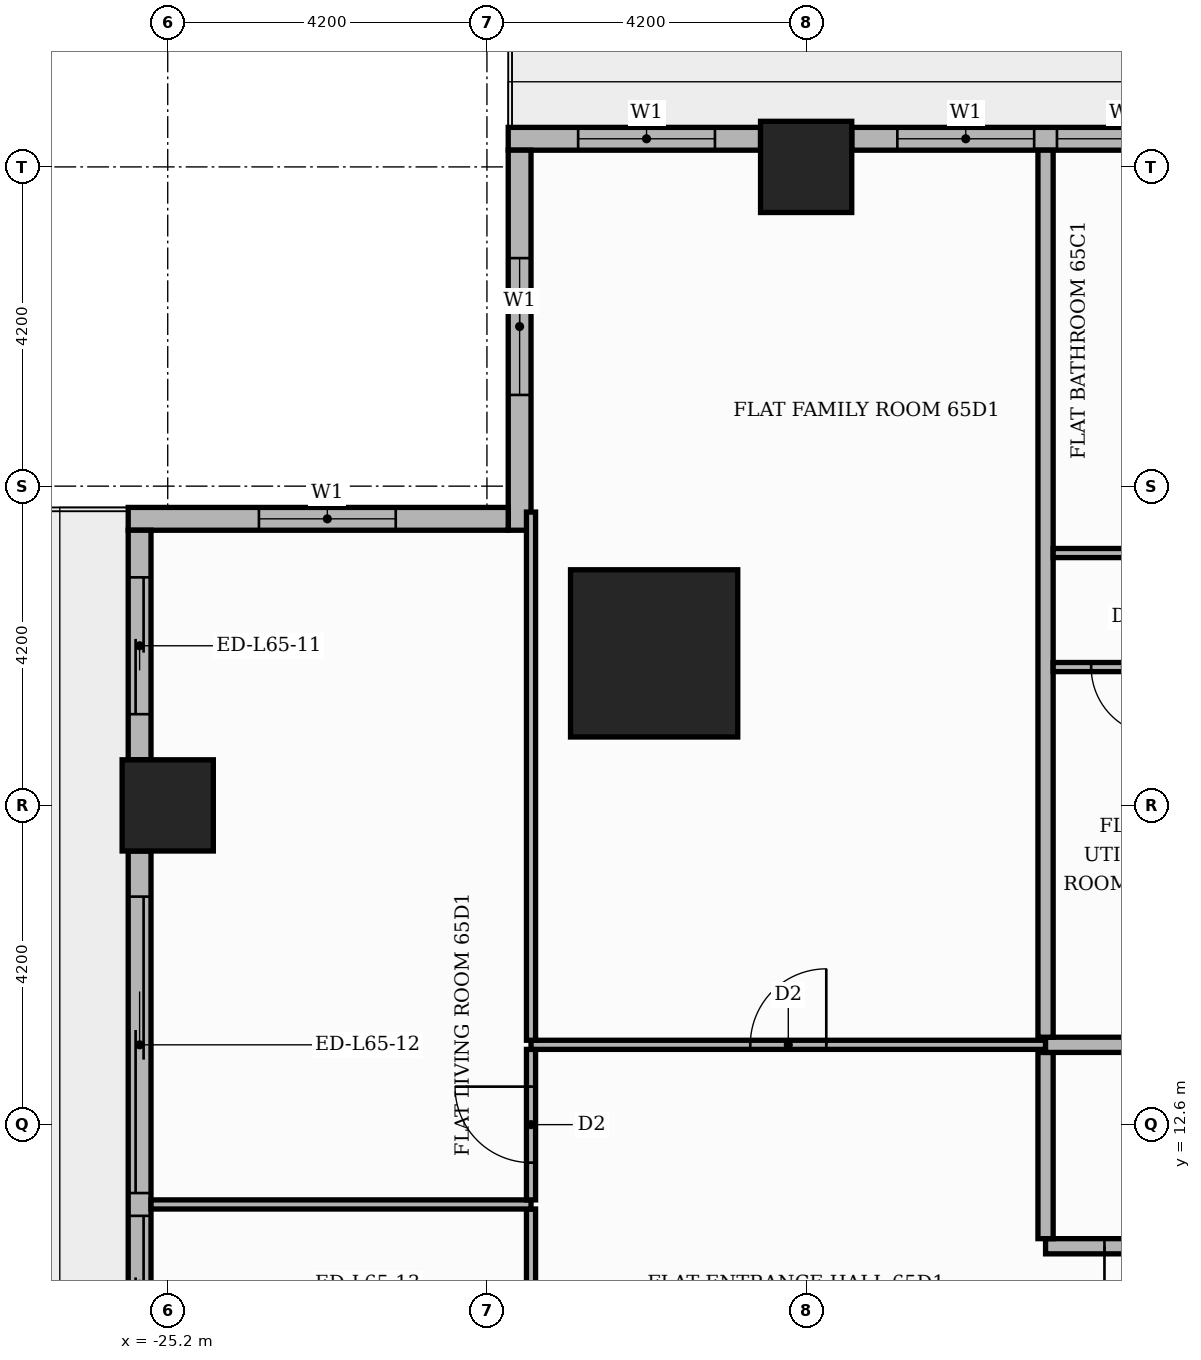
"""IFC4 building model, lengths in metres.
Left out: names, types, materials, properties, quantities, classifications, styles, units other than length and angle.
Written with IfcOpenShell. Run it as: python <this file> out.ifc"""

import sys

from ifc_helpers import new_model, si_unit, direction, frame, frame_2d, origin, origin_2d, place, context, subcontext, project, spatial, rectangle, extrude, element, fill, save


model = new_model("IFC4")
c1 = context("Model", 3, precision=1e-05, world=origin(), true_north=direction((0.0, 1.0)))
c2 = subcontext(c1, "Body", "Model", "MODEL_VIEW")
j1 = project(units=[si_unit("LENGTHUNIT", "METRE"), si_unit("PLANEANGLEUNIT", "RADIAN")], contexts=[c1])
p1 = place(None, origin())
s1 = spatial("IfcSite", under=j1, at=p1, CompositionType="ELEMENT")
p2 = place(p1, origin())
s2 = spatial("IfcBuilding", under=s1, at=p2, CompositionType="ELEMENT")
p3 = place(p2, frame((0.0, 0.0, 271.8)))
s3 = spatial("IfcBuildingStorey", under=s2, at=p3, CompositionType="ELEMENT", Elevation=271.8)
p4 = place(p3, frame((-18.8, 18.8, 0.0), z_axis=(0.0, 0.0, 1.0), x_axis=(1.0, 0.0, 0.0)))
e1 = element("IfcColumn", 1, at=p4, inside=s3, PredefinedType="COLUMN", context=c2, shape_type="SweptSolid", body=[
    extrude(rectangle(XDim=2.2, YDim=2.2, at=origin_2d()), origin(), (0.0, 0.0, 1.0), 3.9),
])
for number, where, z_axis, x_axis in (
    (2, (-16.8, 25.2, 0.0), (0.0, 0.0, 1.0), (1.0, 0.0, 0.0)),
    (3, (-25.2, 16.8, 0.0), (0.0, 0.0, 1.0), (1.0, 0.0, 0.0)),
):
    element("IfcColumn", number, at=place(p3, frame(where, z_axis=z_axis, x_axis=x_axis)), inside=s3, PredefinedType="COLUMN", context=c2, shape_type="SweptSolid", body=[
        extrude(rectangle(XDim=1.2, YDim=1.2, at=origin_2d()), origin(), (0.0, 0.0, 1.0), 3.9),
    ])
p5 = place(p3, frame((-9.0, 25.57, 0.0), z_axis=(0.0, 0.0, 1.0), x_axis=(-1.0, 0.0, 0.0)))
e4 = element("IfcWall", 4, at=p5, inside=s3, PredefinedType="STANDARD", context=c2, shape_type="SweptSolid", body=[
    extrude(rectangle(XDim=7.2, YDim=0.3, at=frame_2d((3.6, 0.0))), origin(), (0.0, 0.0, 1.0), 3.48),
])
p6 = place(p5, frame((0.6, 0.0, 0.9)))
e5 = element("IfcOpeningElement", 5, at=p6, cuts=e4, PredefinedType="OPENING", context=c2, shape_type="SweptSolid", body=[
    extrude(rectangle(XDim=1.8, YDim=2.1, at=frame_2d((0.9, 1.05))), frame((0.0, 0.16, 0.0), z_axis=(0.0, -1.0, 0.0), x_axis=(1.0, 0.0, 0.0)), (0.0, 0.0, 1.0), 0.32),
])
p7 = place(p5, frame((2.7, 0.0, 0.9)))
e6 = element("IfcOpeningElement", 6, at=p7, cuts=e4, PredefinedType="OPENING", context=c2, shape_type="SweptSolid", body=[
    extrude(rectangle(XDim=1.8, YDim=2.1, at=frame_2d((0.9, 1.05))), frame((0.0, 0.16, 0.0), z_axis=(0.0, -1.0, 0.0), x_axis=(1.0, 0.0, 0.0)), (0.0, 0.0, 1.0), 0.32),
])
p8 = place(p5, frame((4.8, 0.0, 0.9)))
e7 = element("IfcOpeningElement", 7, at=p8, cuts=e4, PredefinedType="OPENING", context=c2, shape_type="SweptSolid", body=[
    extrude(rectangle(XDim=1.8, YDim=2.1, at=frame_2d((0.9, 1.05))), frame((0.0, 0.16, 0.0), z_axis=(0.0, -1.0, 0.0), x_axis=(1.0, 0.0, 0.0)), (0.0, 0.0, 1.0), 0.32),
])
p9 = place(p3, frame((-17.4, 25.57, 0.0), z_axis=(0.0, 0.0, 1.0), x_axis=(-1.0, 0.0, 0.0)))
e8 = element("IfcWall", 8, at=p9, inside=s3, PredefinedType="STANDARD", context=c2, shape_type="SweptSolid", body=[
    extrude(rectangle(XDim=3.32, YDim=0.3, at=frame_2d((1.66, 0.0))), origin(), (0.0, 0.0, 1.0), 3.48),
])
p10 = place(p9, frame((0.6, 0.0, 0.9)))
e9 = element("IfcOpeningElement", 9, at=p10, cuts=e8, PredefinedType="OPENING", context=c2, shape_type="SweptSolid", body=[
    extrude(rectangle(XDim=1.8, YDim=2.1, at=frame_2d((0.9, 1.05))), frame((0.0, 0.16, 0.0), z_axis=(0.0, -1.0, 0.0), x_axis=(1.0, 0.0, 0.0)), (0.0, 0.0, 1.0), 0.32),
])
p11 = place(p3, frame((-20.57, 25.42, 0.0), z_axis=(0.0, 0.0, 1.0), x_axis=(0.0, -1.0, 0.0)))
e10 = element("IfcWall", 10, at=p11, inside=s3, PredefinedType="STANDARD", context=c2, shape_type="SweptSolid", body=[
    extrude(rectangle(XDim=5.0, YDim=0.3, at=frame_2d((2.5, 0.0))), origin(), (0.0, 0.0, 1.0), 3.48),
])
p12 = place(p11, frame((1.42, 0.0, 0.9)))
e11 = element("IfcOpeningElement", 11, at=p12, cuts=e10, PredefinedType="OPENING", context=c2, shape_type="SweptSolid", body=[
    extrude(rectangle(XDim=1.8, YDim=2.1, at=frame_2d((0.9, 1.05))), frame((0.0, 0.16, 0.0), z_axis=(0.0, -1.0, 0.0), x_axis=(1.0, 0.0, 0.0)), (0.0, 0.0, 1.0), 0.32),
])
p13 = place(p3, frame((-20.72, 20.57, 0.0), z_axis=(0.0, 0.0, 1.0), x_axis=(-1.0, 0.0, 0.0)))
e12 = element("IfcWall", 12, at=p13, inside=s3, PredefinedType="STANDARD", context=c2, shape_type="SweptSolid", body=[
    extrude(rectangle(XDim=5.0, YDim=0.3, at=frame_2d((2.5, 0.0))), origin(), (0.0, 0.0, 1.0), 3.48),
])
p14 = place(p13, frame((1.48, 0.0, 0.9)))
e13 = element("IfcOpeningElement", 13, at=p14, cuts=e12, PredefinedType="OPENING", context=c2, shape_type="SweptSolid", body=[
    extrude(rectangle(XDim=1.8, YDim=2.1, at=frame_2d((0.9, 1.05))), frame((0.0, 0.16, 0.0), z_axis=(0.0, -1.0, 0.0), x_axis=(1.0, 0.0, 0.0)), (0.0, 0.0, 1.0), 0.32),
])
p15 = place(p3, frame((-25.57, 20.42, 0.0), z_axis=(0.0, 0.0, 1.0), x_axis=(0.0, -1.0, 0.0)))
e14 = element("IfcWall", 14, at=p15, inside=s3, PredefinedType="STANDARD", context=c2, shape_type="SweptSolid", body=[
    extrude(rectangle(XDim=3.02, YDim=0.3, at=frame_2d((1.51, 0.0))), origin(), (0.0, 0.0, 1.0), 3.48),
])
p16 = place(p15, frame((0.62, 0.0, 0.0)))
e15 = element("IfcOpeningElement", 15, at=p16, cuts=e14, PredefinedType="OPENING", context=c2, shape_type="SweptSolid", body=[
    extrude(rectangle(XDim=1.8, YDim=2.4, at=frame_2d((0.9, 1.2))), frame((0.0, 0.16, 0.0), z_axis=(0.0, -1.0, 0.0), x_axis=(1.0, 0.0, 0.0)), (0.0, 0.0, 1.0), 0.32),
])
p17 = place(p3, frame((-25.57, 16.2, 0.0), z_axis=(0.0, 0.0, 1.0), x_axis=(0.0, -1.0, 0.0)))
e16 = element("IfcWall", 16, at=p17, inside=s3, PredefinedType="STANDARD", context=c2, shape_type="SweptSolid", body=[
    extrude(rectangle(XDim=7.2, YDim=0.3, at=frame_2d((3.6, 0.0))), origin(), (0.0, 0.0, 1.0), 3.48),
])
p18 = place(p17, frame((0.6, 0.0, 0.0)))
e17 = element("IfcOpeningElement", 17, at=p18, cuts=e16, PredefinedType="OPENING", context=c2, shape_type="SweptSolid", body=[
    extrude(rectangle(XDim=3.9, YDim=2.4, at=frame_2d((1.95, 1.2))), frame((0.0, 0.16, 0.0), z_axis=(0.0, -1.0, 0.0), x_axis=(1.0, 0.0, 0.0)), (0.0, 0.0, 1.0), 0.32),
])
p19 = place(p17, frame((4.8, 0.0, 0.0)))
e18 = element("IfcOpeningElement", 18, at=p19, cuts=e16, PredefinedType="OPENING", context=c2, shape_type="SweptSolid", body=[
    extrude(rectangle(XDim=1.8, YDim=2.4, at=frame_2d((0.9, 1.2))), frame((0.0, 0.16, 0.0), z_axis=(0.0, -1.0, 0.0), x_axis=(1.0, 0.0, 0.0)), (0.0, 0.0, 1.0), 0.32),
])
p20 = place(p3, frame((-20.42, 3.21, 0.0), z_axis=(0.0, 0.0, 1.0), x_axis=(0.0, 1.0, 0.0)))
e19 = element("IfcWall", 19, at=p20, inside=s3, PredefinedType="PARTITIONING", context=c2, shape_type="SweptSolid", body=[
    extrude(rectangle(XDim=8.28, YDim=0.12, at=frame_2d((4.14, 0.0))), origin(), (0.0, 0.0, 1.0), 3.48),
])
p21 = place(p20, frame((3.69, 0.0, 0.0)))
e20 = element("IfcOpeningElement", 20, at=p21, cuts=e19, PredefinedType="OPENING", context=c2, shape_type="SweptSolid", body=[
    extrude(rectangle(XDim=0.9, YDim=2.1, at=frame_2d((0.45, 1.05))), frame((0.0, 0.07, 0.0), z_axis=(0.0, -1.0, 0.0), x_axis=(1.0, 0.0, 0.0)), (0.0, 0.0, 1.0), 0.14),
])
p22 = place(p3, frame((-13.65, 11.0, 0.0), z_axis=(0.0, 0.0, 1.0), x_axis=(1.0, 0.0, 0.0)))
e21 = element("IfcWall", 21, at=p22, inside=s3, PredefinedType="PARTITIONING", context=c2, shape_type="SweptSolid", body=[
    extrude(rectangle(XDim=2.65, YDim=0.2, at=frame_2d((1.325, 0.0))), origin(), (0.0, 0.0, 1.0), 3.48),
])
p23 = place(p22, frame((0.775, 0.0, 0.0)))
e22 = element("IfcOpeningElement", 22, at=p23, cuts=e21, PredefinedType="OPENING", context=c2, shape_type="SweptSolid", body=[
    extrude(rectangle(XDim=1.1, YDim=2.4, at=frame_2d((0.55, 1.2))), frame((0.0, 0.11, 0.0), z_axis=(0.0, -1.0, 0.0), x_axis=(1.0, 0.0, 0.0)), (0.0, 0.0, 1.0), 0.22),
])
p24 = place(p3, frame((-13.65, 11.1, 0.0), z_axis=(0.0, 0.0, 1.0), x_axis=(0.0, 1.0, 0.0)))
e23 = element("IfcWall", 23, at=p24, inside=s3, PredefinedType="PARTITIONING", context=c2, shape_type="SweptSolid", body=[
    extrude(rectangle(XDim=2.45, YDim=0.2, at=frame_2d((1.225, 0.0))), origin(), (0.0, 0.0, 1.0), 3.48),
])
p25 = place(p3, frame((-25.42, 11.55, 0.0), z_axis=(0.0, 0.0, 1.0), x_axis=(1.0, 0.0, 0.0)))
e24 = element("IfcWall", 24, at=p25, inside=s3, PredefinedType="PARTITIONING", context=c2, shape_type="SweptSolid", body=[
    extrude(rectangle(XDim=5.0, YDim=0.12, at=frame_2d((2.5, 0.0))), origin(), (0.0, 0.0, 1.0), 3.48),
])
p26 = place(p3, frame((-20.42, 11.61, 0.0), z_axis=(0.0, 0.0, 1.0), x_axis=(0.0, 1.0, 0.0)))
e25 = element("IfcWall", 25, at=p26, inside=s3, PredefinedType="PARTITIONING", context=c2, shape_type="SweptSolid", body=[
    extrude(rectangle(XDim=1.98, YDim=0.12, at=frame_2d((0.99, 0.0))), origin(), (0.0, 0.0, 1.0), 3.48),
])
p27 = place(p26, frame((0.49, 0.0, 0.0)))
e26 = element("IfcOpeningElement", 26, at=p27, cuts=e25, PredefinedType="OPENING", context=c2, shape_type="SweptSolid", body=[
    extrude(rectangle(XDim=1.0, YDim=2.1, at=frame_2d((0.5, 1.05))), frame((0.0, 0.07, 0.0), z_axis=(0.0, -1.0, 0.0), x_axis=(1.0, 0.0, 0.0)), (0.0, 0.0, 1.0), 0.14),
])
p28 = place(p3, frame((-20.42, 13.65, 0.0), z_axis=(0.0, 0.0, 1.0), x_axis=(1.0, 0.0, 0.0)))
e27 = element("IfcWall", 27, at=p28, inside=s3, PredefinedType="PARTITIONING", context=c2, shape_type="SweptSolid", body=[
    extrude(rectangle(XDim=6.77, YDim=0.12, at=frame_2d((3.385, 0.0))), origin(), (0.0, 0.0, 1.0), 3.48),
])
p29 = place(p28, frame((2.885, 0.0, 0.0)))
e28 = element("IfcOpeningElement", 28, at=p29, cuts=e27, PredefinedType="OPENING", context=c2, shape_type="SweptSolid", body=[
    extrude(rectangle(XDim=1.0, YDim=2.1, at=frame_2d((0.5, 1.05))), frame((0.0, 0.07, 0.0), z_axis=(0.0, -1.0, 0.0), x_axis=(1.0, 0.0, 0.0)), (0.0, 0.0, 1.0), 0.14),
])
p30 = place(p3, frame((-13.65, 13.65, 0.0), z_axis=(0.0, 0.0, 1.0), x_axis=(1.0, 0.0, 0.0)))
e29 = element("IfcWall", 29, at=p30, inside=s3, PredefinedType="PARTITIONING", context=c2, shape_type="SweptSolid", body=[
    extrude(rectangle(XDim=39.07, YDim=0.2, at=frame_2d((19.535, 0.0))), origin(), (0.0, 0.0, 1.0), 3.48),
])
p31 = place(p30, frame((24.65, 0.0, 0.0)))
e30 = element("IfcOpeningElement", 30, at=p31, cuts=e29, PredefinedType="OPENING", context=c2, shape_type="SweptSolid", body=[
    extrude(rectangle(XDim=1.1, YDim=2.4, at=frame_2d((0.55, 1.2))), frame((0.0, 0.11, 0.0), z_axis=(0.0, -1.0, 0.0), x_axis=(1.0, 0.0, 0.0)), (0.0, 0.0, 1.0), 0.22),
])
p32 = place(p3, frame((-20.42, 13.71, 0.0), z_axis=(0.0, 0.0, 1.0), x_axis=(0.0, 1.0, 0.0)))
e31 = element("IfcWall", 31, at=p32, inside=s3, PredefinedType="PARTITIONING", context=c2, shape_type="SweptSolid", body=[
    extrude(rectangle(XDim=6.949, YDim=0.12, at=frame_2d((3.475, 0.0))), origin(), (0.0, 0.0, 1.0), 3.48),
])
p33 = place(p3, frame((-13.65, 13.75, 0.0), z_axis=(0.0, 0.0, 1.0), x_axis=(0.0, 1.0, 0.0)))
e32 = element("IfcWall", 32, at=p33, inside=s3, PredefinedType="PARTITIONING", context=c2, shape_type="SweptSolid", body=[
    extrude(rectangle(XDim=11.67, YDim=0.2, at=frame_2d((5.835, 0.0))), origin(), (0.0, 0.0, 1.0), 3.48),
])
p34 = place(p3, frame((-13.55, 18.62, 0.0), z_axis=(0.0, 0.0, 1.0), x_axis=(1.0, 0.0, 0.0)))
e33 = element("IfcWall", 33, at=p34, inside=s3, PredefinedType="PARTITIONING", context=c2, shape_type="SweptSolid", body=[
    extrude(rectangle(XDim=23.0, YDim=0.12, at=frame_2d((11.5, 0.0))), origin(), (0.0, 0.0, 1.0), 3.48),
])
p35 = place(p34, frame((19.25, 0.0, 0.0)))
e34 = element("IfcOpeningElement", 34, at=p35, cuts=e33, PredefinedType="OPENING", context=c2, shape_type="SweptSolid", body=[
    extrude(rectangle(XDim=0.9, YDim=2.1, at=frame_2d((0.45, 1.05))), frame((0.0, 0.07, 0.0), z_axis=(0.0, -1.0, 0.0), x_axis=(1.0, 0.0, 0.0)), (0.0, 0.0, 1.0), 0.14),
])
p36 = place(p34, frame((14.0, 0.0, 0.0)))
e35 = element("IfcOpeningElement", 35, at=p36, cuts=e33, PredefinedType="OPENING", context=c2, shape_type="SweptSolid", body=[
    extrude(rectangle(XDim=0.9, YDim=2.1, at=frame_2d((0.45, 1.05))), frame((0.0, 0.07, 0.0), z_axis=(0.0, -1.0, 0.0), x_axis=(1.0, 0.0, 0.0)), (0.0, 0.0, 1.0), 0.14),
])
p37 = place(p34, frame((11.15, 0.0, 0.0)))
e36 = element("IfcOpeningElement", 36, at=p37, cuts=e33, PredefinedType="OPENING", context=c2, shape_type="SweptSolid", body=[
    extrude(rectangle(XDim=0.9, YDim=2.1, at=frame_2d((0.45, 1.05))), frame((0.0, 0.07, 0.0), z_axis=(0.0, -1.0, 0.0), x_axis=(1.0, 0.0, 0.0)), (0.0, 0.0, 1.0), 0.14),
])
p38 = place(p34, frame((6.95, 0.0, 0.0)))
e37 = element("IfcOpeningElement", 37, at=p38, cuts=e33, PredefinedType="OPENING", context=c2, shape_type="SweptSolid", body=[
    extrude(rectangle(XDim=0.9, YDim=2.1, at=frame_2d((0.45, 1.05))), frame((0.0, 0.07, 0.0), z_axis=(0.0, -1.0, 0.0), x_axis=(1.0, 0.0, 0.0)), (0.0, 0.0, 1.0), 0.14),
])
p39 = place(p34, frame((2.6, 0.0, 0.0)))
e38 = element("IfcOpeningElement", 38, at=p39, cuts=e33, PredefinedType="OPENING", context=c2, shape_type="SweptSolid", body=[
    extrude(rectangle(XDim=0.9, YDim=2.1, at=frame_2d((0.45, 1.05))), frame((0.0, 0.07, 0.0), z_axis=(0.0, -1.0, 0.0), x_axis=(1.0, 0.0, 0.0)), (0.0, 0.0, 1.0), 0.14),
])
p40 = place(p34, frame((0.5, 0.0, 0.0)))
e39 = element("IfcOpeningElement", 39, at=p40, cuts=e33, PredefinedType="OPENING", context=c2, shape_type="SweptSolid", body=[
    extrude(rectangle(XDim=0.9, YDim=2.1, at=frame_2d((0.45, 1.05))), frame((0.0, 0.07, 0.0), z_axis=(0.0, -1.0, 0.0), x_axis=(1.0, 0.0, 0.0)), (0.0, 0.0, 1.0), 0.14),
])
p41 = place(p3, frame((-13.55, 20.12, 0.0), z_axis=(0.0, 0.0, 1.0), x_axis=(1.0, 0.0, 0.0)))
e40 = element("IfcWall", 40, at=p41, inside=s3, PredefinedType="PARTITIONING", context=c2, shape_type="SweptSolid", body=[
    extrude(rectangle(XDim=34.269, YDim=0.12, at=frame_2d((17.135, 0.0))), origin(), (0.0, 0.0, 1.0), 3.48),
])
p42 = place(p41, frame((27.75, 0.0, 0.0)))
e41 = element("IfcOpeningElement", 41, at=p42, cuts=e40, PredefinedType="OPENING", context=c2, shape_type="SweptSolid", body=[
    extrude(rectangle(XDim=1.0, YDim=2.1, at=frame_2d((0.5, 1.05))), frame((0.0, 0.07, 0.0), z_axis=(0.0, -1.0, 0.0), x_axis=(1.0, 0.0, 0.0)), (0.0, 0.0, 1.0), 0.14),
])
p43 = place(p41, frame((22.5, 0.0, 0.0)))
e42 = element("IfcOpeningElement", 42, at=p43, cuts=e40, PredefinedType="OPENING", context=c2, shape_type="SweptSolid", body=[
    extrude(rectangle(XDim=1.0, YDim=2.1, at=frame_2d((0.5, 1.05))), frame((0.0, 0.07, 0.0), z_axis=(0.0, -1.0, 0.0), x_axis=(1.0, 0.0, 0.0)), (0.0, 0.0, 1.0), 0.14),
])
p44 = place(p41, frame((14.15, 0.0, 0.0)))
e43 = element("IfcOpeningElement", 43, at=p44, cuts=e40, PredefinedType="OPENING", context=c2, shape_type="SweptSolid", body=[
    extrude(rectangle(XDim=0.9, YDim=2.1, at=frame_2d((0.45, 1.05))), frame((0.0, 0.07, 0.0), z_axis=(0.0, -1.0, 0.0), x_axis=(1.0, 0.0, 0.0)), (0.0, 0.0, 1.0), 0.14),
])
p45 = place(p41, frame((3.65, 0.0, 0.0)))
e44 = element("IfcOpeningElement", 44, at=p45, cuts=e40, PredefinedType="OPENING", context=c2, shape_type="SweptSolid", body=[
    extrude(rectangle(XDim=0.9, YDim=2.1, at=frame_2d((0.45, 1.05))), frame((0.0, 0.07, 0.0), z_axis=(0.0, -1.0, 0.0), x_axis=(1.0, 0.0, 0.0)), (0.0, 0.0, 1.0), 0.14),
])
p46 = place(p7, origin())
e45 = element("IfcWindow", 45, at=p46, inside=s3, PartitioningType="SINGLE_PANEL", PredefinedType="WINDOW", context=c2, shape_type="SweptSolid", body=[
    extrude(rectangle(XDim=1.8, YDim=2.1, at=frame_2d((0.9, 1.05))), frame((0.0, 0.03, 0.0), z_axis=(0.0, -1.0, 0.0), x_axis=(1.0, 0.0, 0.0)), (0.0, 0.0, 1.0), 0.06),
])
fill(e6, e45)
p47 = place(p8, origin())
e46 = element("IfcWindow", 46, at=p47, inside=s3, PartitioningType="SINGLE_PANEL", PredefinedType="WINDOW", context=c2, shape_type="SweptSolid", body=[
    extrude(rectangle(XDim=1.8, YDim=2.1, at=frame_2d((0.9, 1.05))), frame((0.0, 0.03, 0.0), z_axis=(0.0, -1.0, 0.0), x_axis=(1.0, 0.0, 0.0)), (0.0, 0.0, 1.0), 0.06),
])
fill(e7, e46)
p48 = place(p10, origin())
e47 = element("IfcWindow", 47, at=p48, inside=s3, PartitioningType="SINGLE_PANEL", PredefinedType="WINDOW", context=c2, shape_type="SweptSolid", body=[
    extrude(rectangle(XDim=1.8, YDim=2.1, at=frame_2d((0.9, 1.05))), frame((0.0, 0.03, 0.0), z_axis=(0.0, -1.0, 0.0), x_axis=(1.0, 0.0, 0.0)), (0.0, 0.0, 1.0), 0.06),
])
fill(e9, e47)
p49 = place(p12, origin())
e48 = element("IfcWindow", 48, at=p49, inside=s3, PartitioningType="SINGLE_PANEL", PredefinedType="WINDOW", context=c2, shape_type="SweptSolid", body=[
    extrude(rectangle(XDim=1.8, YDim=2.1, at=frame_2d((0.9, 1.05))), frame((0.0, 0.03, 0.0), z_axis=(0.0, -1.0, 0.0), x_axis=(1.0, 0.0, 0.0)), (0.0, 0.0, 1.0), 0.06),
])
fill(e11, e48)
p50 = place(p14, origin())
e49 = element("IfcWindow", 49, at=p50, inside=s3, PartitioningType="SINGLE_PANEL", PredefinedType="WINDOW", context=c2, shape_type="SweptSolid", body=[
    extrude(rectangle(XDim=1.8, YDim=2.1, at=frame_2d((0.9, 1.05))), frame((0.0, 0.03, 0.0), z_axis=(0.0, -1.0, 0.0), x_axis=(1.0, 0.0, 0.0)), (0.0, 0.0, 1.0), 0.06),
])
fill(e13, e49)
p51 = place(p16, origin())
e50 = element("IfcDoor", 50, at=p51, inside=s3, OperationType="SLIDING_TO_RIGHT", PredefinedType="DOOR", context=c2, shape_type="SweptSolid", body=[
    extrude(rectangle(XDim=1.8, YDim=2.4, at=frame_2d((0.9, 1.2))), frame((0.0, 0.025, 0.0), z_axis=(0.0, -1.0, 0.0), x_axis=(1.0, 0.0, 0.0)), (0.0, 0.0, 1.0), 0.05),
])
fill(e15, e50)
p52 = place(p18, origin())
e51 = element("IfcDoor", 51, at=p52, inside=s3, OperationType="SLIDING_TO_LEFT", PredefinedType="DOOR", context=c2, shape_type="SweptSolid", body=[
    extrude(rectangle(XDim=3.9, YDim=2.4, at=frame_2d((1.95, 1.2))), frame((0.0, 0.025, 0.0), z_axis=(0.0, -1.0, 0.0), x_axis=(1.0, 0.0, 0.0)), (0.0, 0.0, 1.0), 0.05),
])
fill(e17, e51)
p53 = place(p19, origin())
e52 = element("IfcDoor", 52, at=p53, inside=s3, OperationType="SLIDING_TO_RIGHT", PredefinedType="DOOR", context=c2, shape_type="SweptSolid", body=[
    extrude(rectangle(XDim=1.8, YDim=2.4, at=frame_2d((0.9, 1.2))), frame((0.0, 0.025, 0.0), z_axis=(0.0, -1.0, 0.0), x_axis=(1.0, 0.0, 0.0)), (0.0, 0.0, 1.0), 0.05),
])
fill(e18, e52)
p54 = place(p40, frame((0.9, 0.0, 0.0), z_axis=(0.0, 0.0, 1.0), x_axis=(-1.0, 0.0, 0.0)))
e53 = element("IfcDoor", 53, at=p54, inside=s3, OperationType="SINGLE_SWING_RIGHT", PredefinedType="DOOR", context=c2, shape_type="SweptSolid", body=[
    extrude(rectangle(XDim=0.9, YDim=2.1, at=frame_2d((0.45, 1.05))), frame((0.0, 0.025, 0.0), z_axis=(0.0, -1.0, 0.0), x_axis=(1.0, 0.0, 0.0)), (0.0, 0.0, 1.0), 0.05),
])
fill(e39, e53)
p55 = place(p23, frame((1.1, 0.0, 0.0), z_axis=(0.0, 0.0, 1.0), x_axis=(-1.0, 0.0, 0.0)))
e54 = element("IfcDoor", 54, at=p55, inside=s3, OperationType="SINGLE_SWING_LEFT", PredefinedType="DOOR", context=c2, shape_type="SweptSolid", body=[
    extrude(rectangle(XDim=1.1, YDim=2.4, at=frame_2d((0.55, 1.2))), frame((0.0, 0.025, 0.0), z_axis=(0.0, -1.0, 0.0), x_axis=(1.0, 0.0, 0.0)), (0.0, 0.0, 1.0), 0.05),
])
fill(e22, e54)
p56 = place(p29, origin())
e55 = element("IfcDoor", 55, at=p56, inside=s3, OperationType="SINGLE_SWING_RIGHT", PredefinedType="DOOR", context=c2, shape_type="SweptSolid", body=[
    extrude(rectangle(XDim=1.0, YDim=2.1, at=frame_2d((0.5, 1.05))), frame((0.0, 0.025, 0.0), z_axis=(0.0, -1.0, 0.0), x_axis=(1.0, 0.0, 0.0)), (0.0, 0.0, 1.0), 0.05),
])
fill(e28, e55)
p57 = place(p27, origin())
e56 = element("IfcDoor", 56, at=p57, inside=s3, OperationType="SINGLE_SWING_RIGHT", PredefinedType="DOOR", context=c2, shape_type="SweptSolid", body=[
    extrude(rectangle(XDim=1.0, YDim=2.1, at=frame_2d((0.5, 1.05))), frame((0.0, 0.025, 0.0), z_axis=(0.0, -1.0, 0.0), x_axis=(1.0, 0.0, 0.0)), (0.0, 0.0, 1.0), 0.05),
])
fill(e26, e56)
save(model, sys.argv[1])
